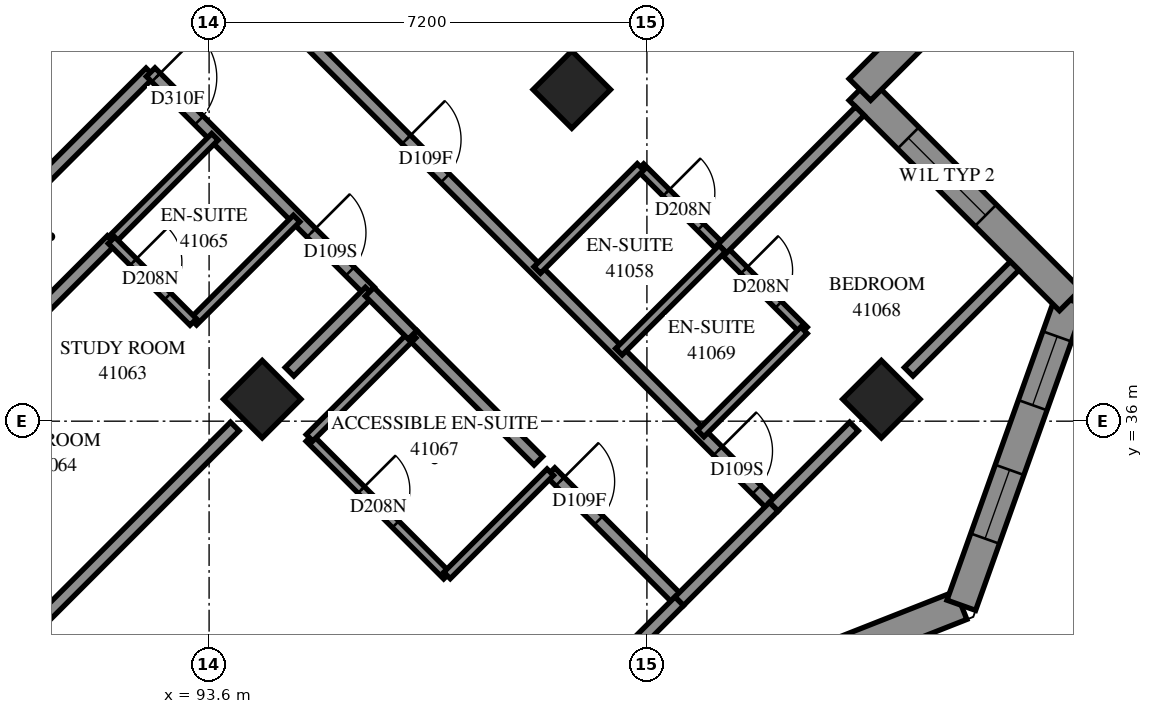
"""IFC4 building model, lengths in metres.
Left out: names, types, materials, properties, quantities, classifications, styles, units other than length and angle.
Written with IfcOpenShell. Run it as: python <this file> out.ifc"""

import sys

from ifc_helpers import new_model, si_unit, direction, frame, frame_2d, origin, origin_2d, place, context, subcontext, project, spatial, polyline, rectangle, outline, extrude, element, fill, save


model = new_model("IFC4")
c1 = context("Model", 3, precision=1e-05, world=origin(), true_north=direction((0.0, 1.0)))
c2 = subcontext(c1, "Body", "Model", "MODEL_VIEW")
j1 = project(units=[si_unit("LENGTHUNIT", "METRE"), si_unit("PLANEANGLEUNIT", "RADIAN")], contexts=[c1])
p1 = place(None, origin())
s1 = spatial("IfcSite", under=j1, at=p1, CompositionType="ELEMENT")
p2 = place(p1, origin())
s2 = spatial("IfcBuilding", under=s1, at=p2, CompositionType="ELEMENT")
p3 = place(p2, frame((0.0, 0.0, 152.4)))
s3 = spatial("IfcBuildingStorey", under=s2, at=p3, CompositionType="ELEMENT", Elevation=152.4)
for number, where, z_axis, x_axis in (
    (1, (99.565, 41.453, 0.0), (0.0, 0.0, 1.0), (0.707, -0.707, 0.0)),
    (2, (94.474, 36.362, 0.0), (0.0, 0.0, 1.0), (0.707, -0.707, 0.0)),
    (3, (104.656, 36.362, 0.0), (0.0, 0.0, 1.0), (0.707, -0.707, 0.0)),
):
    element("IfcColumn", number, at=place(p3, frame(where, z_axis=z_axis, x_axis=x_axis)), inside=s3, PredefinedType="COLUMN", context=c2, shape_type="SweptSolid", body=[
        extrude(rectangle(XDim=0.9, YDim=0.9, at=origin_2d()), origin(), (0.0, 0.0, 1.0), 3.1),
    ])
p4 = place(p3, frame((87.049, 38.695, -0.3), z_axis=(0.0, 0.0, 1.0), x_axis=(0.7071067812, 0.7071067812, 0.0)))
e4 = element("IfcWall", 4, at=p4, inside=s3, PredefinedType="SHEAR", context=c2, shape_type="SweptSolid", body=[
    extrude(rectangle(XDim=14.4, YDim=0.6, at=frame_2d((7.2, 0.0))), origin(), (0.0, 0.0, 1.0), 2.7),
])
p5 = place(p4, frame((4.55, 0.0, 0.3)))
e5 = element("IfcOpeningElement", 5, at=p5, cuts=e4, PredefinedType="OPENING", context=c2, shape_type="SweptSolid", body=[
    extrude(rectangle(XDim=1.1, YDim=2.1, at=frame_2d((0.55, 1.05))), frame((0.0, 0.31, 0.0), z_axis=(0.0, -1.0, 0.0), x_axis=(1.0, 0.0, 0.0)), (0.0, 0.0, 1.0), 0.62),
])
p6 = place(p4, frame((11.35, 0.0, 0.3)))
e6 = element("IfcOpeningElement", 6, at=p6, cuts=e4, PredefinedType="OPENING", context=c2, shape_type="SweptSolid", body=[
    extrude(rectangle(XDim=1.1, YDim=2.1, at=frame_2d((0.55, 1.05))), frame((0.0, 0.31, 0.0), z_axis=(0.0, -1.0, 0.0), x_axis=(1.0, 0.0, 0.0)), (0.0, 0.0, 1.0), 0.62),
])
p7 = place(p3, frame((100.839, 30.95, 0.0), z_axis=(0.0, 0.0, 1.0), x_axis=(0.9303343627, 0.3667123852, 0.0)))
e7 = element("IfcWall", 7, at=p7, inside=s3, PredefinedType="SOLIDWALL", context=c2, shape_type="SweptSolid", body=[
    extrude(outline(polyline([(0.109, -0.25), (5.629, -0.25), (5.402, 0.25), (-0.109, 0.25), (0.109, -0.25)])), origin(), (0.0, 0.0, 1.0), 3.1),
])
p8 = place(p7, frame((0.614, 0.0, 0.45)))
e8 = element("IfcOpeningElement", 8, at=p8, cuts=e7, PredefinedType="OPENING", context=c2, shape_type="SweptSolid", body=[
    extrude(rectangle(XDim=2.8, YDim=2.5, at=frame_2d((1.4, 1.25))), frame((0.0, 0.26, 0.0), z_axis=(0.0, -1.0, 0.0), x_axis=(1.0, 0.0, 0.0)), (0.0, 0.0, 1.0), 0.52),
])
p9 = place(p3, frame((105.97, 32.973, 0.0), z_axis=(0.0, 0.0, 1.0), x_axis=(0.3360618931, 0.9418399036, 0.0)))
e9 = element("IfcWall", 9, at=p9, inside=s3, PredefinedType="SOLIDWALL", context=c2, shape_type="SweptSolid", body=[
    extrude(outline(polyline([(-0.114, -0.25), (5.489, -0.25), (5.173, 0.25), (0.114, 0.25), (-0.114, -0.25)])), origin(), (0.0, 0.0, 1.0), 3.1),
])
p10 = place(p9, frame((1.164, 0.0, 0.45)))
e10 = element("IfcOpeningElement", 10, at=p10, cuts=e9, PredefinedType="OPENING", context=c2, shape_type="SweptSolid", body=[
    extrude(rectangle(XDim=1.2, YDim=2.5, at=frame_2d((0.6, 1.25))), frame((0.0, 0.26, 0.0), z_axis=(0.0, -1.0, 0.0), x_axis=(1.0, 0.0, 0.0)), (0.0, 0.0, 1.0), 0.52),
])
p11 = place(p9, frame((3.494, 0.0, 0.45)))
e11 = element("IfcOpeningElement", 11, at=p11, cuts=e9, PredefinedType="OPENING", context=c2, shape_type="SweptSolid", body=[
    extrude(rectangle(XDim=1.2, YDim=2.5, at=frame_2d((0.6, 1.25))), frame((0.0, 0.26, 0.0), z_axis=(0.0, -1.0, 0.0), x_axis=(1.0, 0.0, 0.0)), (0.0, 0.0, 1.0), 0.52),
])
p12 = place(p3, frame((107.761, 37.994, 0.0), z_axis=(0.0, 0.0, 1.0), x_axis=(-0.7071272228, 0.707086339, 0.0)))
e12 = element("IfcWall", 12, at=p12, inside=s3, PredefinedType="SOLIDWALL", context=c2, shape_type="SweptSolid", body=[
    extrude(outline(polyline([(-0.158, -0.25), (4.642, -0.25), (5.142, 0.25), (0.158, 0.25), (-0.158, -0.25)])), origin(), (0.0, 0.0, 1.0), 3.1),
])
p13 = place(p12, frame((1.967, 0.0, 0.6)))
e13 = element("IfcOpeningElement", 13, at=p13, cuts=e12, PredefinedType="OPENING", context=c2, shape_type="SweptSolid", body=[
    extrude(rectangle(XDim=1.8, YDim=1.9, at=frame_2d((0.9, 0.95))), frame((0.0, 0.26, 0.0), z_axis=(0.0, -1.0, 0.0), x_axis=(1.0, 0.0, 0.0)), (0.0, 0.0, 1.0), 0.52),
])
p14 = place(p3, frame((104.302, 41.453, 0.0), z_axis=(0.0, 0.0, 1.0), x_axis=(0.7071241375, 0.7070894244, 0.0)))
e14 = element("IfcWall", 14, at=p14, inside=s3, PredefinedType="SOLIDWALL", context=c2, shape_type="SweptSolid", body=[
    extrude(outline(polyline([(0.25, -0.25), (6.101, -0.25), (5.422, 0.25), (-0.25, 0.25), (0.25, -0.25)])), origin(), (0.0, 0.0, 1.0), 3.1),
])
p15 = place(p14, frame((1.125, 0.0, 0.6)))
e15 = element("IfcOpeningElement", 15, at=p15, cuts=e14, PredefinedType="OPENING", context=c2, shape_type="SweptSolid", body=[
    extrude(rectangle(XDim=1.8, YDim=1.9, at=frame_2d((0.9, 0.95))), frame((0.0, 0.26, 0.0), z_axis=(0.0, -1.0, 0.0), x_axis=(1.0, 0.0, 0.0)), (0.0, 0.0, 1.0), 0.52),
])
p16 = place(p3, frame((94.189, 43.287, 0.0), z_axis=(0.0, 0.0, 1.0), x_axis=(0.7071067812, -0.7071067812, 0.0)))
e16 = element("IfcWall", 16, at=p16, inside=s3, PredefinedType="PARTITIONING", context=c2, shape_type="SweptSolid", body=[
    extrude(rectangle(XDim=12.298, YDim=0.2, at=frame_2d((6.149, 0.0))), origin(), (0.0, 0.0, 1.0), 3.1),
])
p17 = place(p16, frame((3.755, 0.0, 0.0)))
e17 = element("IfcOpeningElement", 17, at=p17, cuts=e16, PredefinedType="OPENING", context=c2, shape_type="SweptSolid", body=[
    extrude(rectangle(XDim=0.9, YDim=2.1, at=frame_2d((0.45, 1.05))), frame((0.0, 0.11, 0.0), z_axis=(0.0, -1.0, 0.0), x_axis=(1.0, 0.0, 0.0)), (0.0, 0.0, 1.0), 0.22),
])
p18 = place(p16, frame((10.998, 0.0, 0.0)))
e18 = element("IfcOpeningElement", 18, at=p18, cuts=e16, PredefinedType="OPENING", context=c2, shape_type="SweptSolid", body=[
    extrude(rectangle(XDim=0.9, YDim=2.1, at=frame_2d((0.45, 1.05))), frame((0.0, 0.11, 0.0), z_axis=(0.0, -1.0, 0.0), x_axis=(1.0, 0.0, 0.0)), (0.0, 0.0, 1.0), 0.22),
])
p19 = place(p3, frame((86.836, 35.938, 0.0), z_axis=(0.0, 0.0, 1.0), x_axis=(0.7071067812, 0.7071067812, 0.0)))
e19 = element("IfcWall", 19, at=p19, inside=s3, PredefinedType="PARTITIONING", context=c2, shape_type="SweptSolid", body=[
    extrude(rectangle(XDim=8.2, YDim=0.2, at=frame_2d((4.1, 0.0))), origin(), (0.0, 0.0, 1.0), 3.1),
])
p20 = place(p3, frame((86.33, 33.311, 0.0), z_axis=(0.0, 0.0, 1.0), x_axis=(0.707100543, 0.7071130194, 0.0)))
e20 = element("IfcWall", 20, at=p20, inside=s3, PredefinedType="PARTITIONING", context=c2, shape_type="SweptSolid", body=[
    extrude(rectangle(XDim=8.015, YDim=0.2, at=frame_2d((4.008, 0.0))), origin(), (0.0, 0.0, 1.0), 3.1),
])
p21 = place(p3, frame((89.831, 31.721, 0.0), z_axis=(0.0, 0.0, 1.0), x_axis=(0.7071067812, 0.7071067812, 0.0)))
e21 = element("IfcWall", 21, at=p21, inside=s3, PredefinedType="PARTITIONING", context=c2, shape_type="SweptSolid", body=[
    extrude(rectangle(XDim=5.928, YDim=0.2, at=frame_2d((2.964, 0.0))), origin(), (0.0, 0.0, 1.0), 3.1),
])
p22 = place(p3, frame((92.639, 41.739, 0.0), z_axis=(0.0, 0.0, 1.0), x_axis=(0.7071067812, -0.7071067812, 0.0)))
e22 = element("IfcWall", 22, at=p22, inside=s3, PredefinedType="PARTITIONING", context=c2, shape_type="SweptSolid", body=[
    extrude(rectangle(XDim=5.1, YDim=0.2, at=frame_2d((2.55, 0.0))), origin(), (0.0, 0.0, 1.0), 3.1),
])
p23 = place(p22, frame((0.123, 0.0, 0.0)))
e23 = element("IfcOpeningElement", 23, at=p23, cuts=e22, PredefinedType="OPENING", context=c2, shape_type="SweptSolid", body=[
    extrude(rectangle(XDim=1.0, YDim=2.1, at=frame_2d((0.5, 1.05))), frame((0.0, 0.11, 0.0), z_axis=(0.0, -1.0, 0.0), x_axis=(1.0, 0.0, 0.0)), (0.0, 0.0, 1.0), 0.22),
])
p24 = place(p22, frame((3.734, 0.0, 0.0)))
e24 = element("IfcOpeningElement", 24, at=p24, cuts=e22, PredefinedType="OPENING", context=c2, shape_type="SweptSolid", body=[
    extrude(rectangle(XDim=0.9, YDim=2.1, at=frame_2d((0.45, 1.05))), frame((0.0, 0.11, 0.0), z_axis=(0.0, -1.0, 0.0), x_axis=(1.0, 0.0, 0.0)), (0.0, 0.0, 1.0), 0.22),
])
p25 = place(p3, frame((100.694, 40.178, 0.0), z_axis=(0.0, 0.0, 1.0), x_axis=(0.7076329021, -0.7065802685, 0.0)))
e25 = element("IfcWall", 25, at=p25, inside=s3, PredefinedType="PARTITIONING", context=c2, shape_type="SweptSolid", body=[
    extrude(rectangle(XDim=3.8, YDim=0.15, at=frame_2d((1.9, 0.0))), origin(), (0.0, 0.0, 1.0), 3.1),
])
p26 = place(p25, frame((0.598, 0.0, 0.0)))
e26 = element("IfcOpeningElement", 26, at=p26, cuts=e25, PredefinedType="OPENING", context=c2, shape_type="SweptSolid", body=[
    extrude(rectangle(XDim=0.8, YDim=2.1, at=frame_2d((0.4, 1.05))), frame((0.0, 0.085, 0.0), z_axis=(0.0, -1.0, 0.0), x_axis=(1.0, 0.0, 0.0)), (0.0, 0.0, 1.0), 0.17),
])
p27 = place(p25, frame((2.405, 0.0, 0.0)))
e27 = element("IfcOpeningElement", 27, at=p27, cuts=e25, PredefinedType="OPENING", context=c2, shape_type="SweptSolid", body=[
    extrude(rectangle(XDim=0.8, YDim=2.1, at=frame_2d((0.4, 1.05))), frame((0.0, 0.085, 0.0), z_axis=(0.0, -1.0, 0.0), x_axis=(1.0, 0.0, 0.0)), (0.0, 0.0, 1.0), 0.17),
])
p28 = place(p3, frame((95.249, 35.723, 0.0), z_axis=(0.0, 0.0, 1.0), x_axis=(0.7067942478, -0.7074191764, 0.0)))
e28 = element("IfcWall", 28, at=p28, inside=s3, PredefinedType="PARTITIONING", context=c2, shape_type="SweptSolid", body=[
    extrude(rectangle(XDim=3.2, YDim=0.15, at=frame_2d((1.6, 0.0))), origin(), (0.0, 0.0, 1.0), 3.1),
])
p29 = place(p28, frame((1.206, 0.0, 0.0)))
e29 = element("IfcOpeningElement", 29, at=p29, cuts=e28, PredefinedType="OPENING", context=c2, shape_type="SweptSolid", body=[
    extrude(rectangle(XDim=0.8, YDim=2.1, at=frame_2d((0.4, 1.05))), frame((0.0, 0.085, 0.0), z_axis=(0.0, -1.0, 0.0), x_axis=(1.0, 0.0, 0.0)), (0.0, 0.0, 1.0), 0.17),
])
p30 = place(p3, frame((102.04, 38.838, 0.0), z_axis=(0.0, 0.0, 1.0), x_axis=(0.7071067812, 0.7071067812, 0.0)))
e30 = element("IfcWall", 30, at=p30, inside=s3, PredefinedType="PARTITIONING", context=c2, shape_type="SweptSolid", body=[
    extrude(rectangle(XDim=3.199, YDim=0.2, at=frame_2d((1.599, 0.0))), origin(), (0.0, 0.0, 1.0), 3.1),
])
p31 = place(p3, frame((99.214, 35.162, 0.0), z_axis=(0.0, 0.0, 1.0), x_axis=(0.706773319, -0.7074400862, 0.0)))
e31 = element("IfcWall", 31, at=p31, inside=s3, PredefinedType="PARTITIONING", context=c2, shape_type="SweptSolid", body=[
    extrude(rectangle(XDim=2.999, YDim=0.2, at=frame_2d((1.5, 0.0))), origin(), (0.0, 0.0, 1.0), 3.1),
])
p32 = place(p31, frame((0.22, 0.0, 0.0)))
e32 = element("IfcOpeningElement", 32, at=p32, cuts=e31, PredefinedType="OPENING", context=c2, shape_type="SweptSolid", body=[
    extrude(rectangle(XDim=0.9, YDim=2.1, at=frame_2d((0.45, 1.05))), frame((0.0, 0.11, 0.0), z_axis=(0.0, -1.0, 0.0), x_axis=(1.0, 0.0, 0.0)), (0.0, 0.0, 1.0), 0.22),
])
p33 = place(p3, frame((96.945, 37.419, 0.0), z_axis=(0.0, 0.0, 1.0), x_axis=(0.7071067812, -0.7071067812, 0.0)))
e33 = element("IfcWall", 33, at=p33, inside=s3, PredefinedType="PARTITIONING", context=c2, shape_type="SweptSolid", body=[
    extrude(rectangle(XDim=2.927, YDim=0.2, at=frame_2d((1.464, 0.0))), origin(), (0.0, 0.0, 1.0), 3.1),
])
p34 = place(p3, frame((105.105, 36.813, 0.0), z_axis=(0.0, 0.0, 1.0), x_axis=(0.7071067812, 0.7071067812, 0.0)))
e34 = element("IfcWall", 34, at=p34, inside=s3, PredefinedType="PARTITIONING", context=c2, shape_type="SweptSolid", body=[
    extrude(rectangle(XDim=2.463, YDim=0.2, at=frame_2d((1.232, 0.0))), origin(), (0.0, 0.0, 1.0), 3.1),
])
for number, where, z_axis, x_axis in (
    (35, (97.513, 33.463, 0.0), (0.0, 0.0, 1.0), (0.707, 0.707, 0.0)),
    (36, (93.341, 37.635, 0.0), (0.0, 0.0, 1.0), (0.707, 0.707, 0.0)),
    (37, (101.685, 35.797, 0.0), (0.0, 0.0, 1.0), (0.707, 0.707, 0.0)),
    (38, (91.997, 38.979, 0.0), (0.0, 0.0, 1.0), (0.707, 0.707, 0.0)),
):
    element("IfcWall", number, at=place(p3, frame(where, z_axis=z_axis, x_axis=x_axis)), inside=s3, PredefinedType="PARTITIONING", context=c2, shape_type="SweptSolid", body=[
        extrude(rectangle(XDim=2.401, YDim=0.15, at=frame_2d((1.201, 0.0))), origin(), (0.0, 0.0, 1.0), 3.1),
    ])
for number, where, z_axis, x_axis in (
    (39, (100.34, 37.142, 0.0), (0.0, 0.0, 1.0), (0.708, 0.707, 0.0)),
    (40, (98.996, 38.486, 0.0), (0.0, 0.0, 1.0), (0.708, 0.707, 0.0)),
):
    element("IfcWall", number, at=place(p3, frame(where, z_axis=z_axis, x_axis=x_axis)), inside=s3, PredefinedType="PARTITIONING", context=c2, shape_type="SweptSolid", body=[
        extrude(rectangle(XDim=2.4, YDim=0.15, at=frame_2d((1.2, 0.0))), origin(), (0.0, 0.0, 1.0), 3.1),
    ])
p35 = place(p3, frame((95.251, 35.727, 0.0), z_axis=(0.0, 0.0, 1.0), x_axis=(0.7071067812, 0.7071067812, 0.0)))
e41 = element("IfcWall", 41, at=p35, inside=s3, PredefinedType="PARTITIONING", context=c2, shape_type="SweptSolid", body=[
    extrude(rectangle(XDim=2.398, YDim=0.15, at=frame_2d((1.199, 0.0))), origin(), (0.0, 0.0, 1.0), 3.1),
])
p36 = place(p3, frame((101.331, 33.039, 0.0), z_axis=(0.0, 0.0, 1.0), x_axis=(0.7071067812, 0.7071067812, 0.0)))
e42 = element("IfcWall", 42, at=p36, inside=s3, PredefinedType="PARTITIONING", context=c2, shape_type="SweptSolid", body=[
    extrude(rectangle(XDim=2.2, YDim=0.2, at=frame_2d((1.1, 0.0))), origin(), (0.0, 0.0, 1.0), 2.6),
])
p37 = place(p3, frame((91.995, 38.975, 0.0), z_axis=(0.0, 0.0, 1.0), x_axis=(0.7071067812, -0.7071067812, 0.0)))
e43 = element("IfcWall", 43, at=p37, inside=s3, PredefinedType="PARTITIONING", context=c2, shape_type="SweptSolid", body=[
    extrude(rectangle(XDim=1.901, YDim=0.15, at=frame_2d((0.95, 0.0))), origin(), (0.0, 0.0, 1.0), 3.1),
])
p38 = place(p37, frame((0.506, 0.0, 0.0)))
e44 = element("IfcOpeningElement", 44, at=p38, cuts=e43, PredefinedType="OPENING", context=c2, shape_type="SweptSolid", body=[
    extrude(rectangle(XDim=0.8, YDim=2.1, at=frame_2d((0.4, 1.05))), frame((0.0, 0.085, 0.0), z_axis=(0.0, -1.0, 0.0), x_axis=(1.0, 0.0, 0.0)), (0.0, 0.0, 1.0), 0.17),
])
p39 = place(p3, frame((102.887, 34.595, 0.0), z_axis=(0.0, 0.0, 1.0), x_axis=(0.7071067812, 0.7071067812, 0.0)))
e45 = element("IfcWall", 45, at=p39, inside=s3, PredefinedType="PARTITIONING", context=c2, shape_type="SweptSolid", body=[
    extrude(rectangle(XDim=1.864, YDim=0.2, at=frame_2d((0.932, 0.0))), origin(), (0.0, 0.0, 1.0), 2.6),
])
p40 = place(p3, frame((94.923, 36.813, 0.0), z_axis=(0.0, 0.0, 1.0), x_axis=(0.7071067812, 0.7071067812, 0.0)))
e46 = element("IfcWall", 46, at=p40, inside=s3, PredefinedType="PARTITIONING", context=c2, shape_type="SweptSolid", body=[
    extrude(rectangle(XDim=1.864, YDim=0.2, at=frame_2d((0.932, 0.0))), origin(), (0.0, 0.0, 1.0), 3.1),
])
p41 = place(p3, frame((100.013, 31.721, 0.0), z_axis=(0.0, 0.0, 1.0), x_axis=(0.7071067812, 0.7071067812, 0.0)))
e47 = element("IfcWall", 47, at=p41, inside=s3, PredefinedType="PARTITIONING", context=c2, shape_type="SweptSolid", body=[
    extrude(rectangle(XDim=1.864, YDim=0.2, at=frame_2d((0.932, 0.0))), origin(), (0.0, 0.0, 1.0), 2.6),
])
p42 = place(p3, frame((96.24, 38.128, 0.0), z_axis=(0.0, 0.0, 1.0), x_axis=(0.7061059238, -0.7081062239, 0.0)))
e48 = element("IfcWall", 48, at=p42, inside=s3, PredefinedType="PARTITIONING", context=c2, shape_type="SweptSolid", body=[
    extrude(rectangle(XDim=1.0, YDim=0.2, at=frame_2d((0.5, 0.0))), origin(), (0.0, 0.0, 1.0), 3.1),
])
p43 = place(p10, origin())
e49 = element("IfcWindow", 49, at=p43, inside=s3, PartitioningType="SINGLE_PANEL", PredefinedType="WINDOW", context=c2, shape_type="SweptSolid", body=[
    extrude(rectangle(XDim=1.2, YDim=2.5, at=frame_2d((0.6, 1.25))), frame((0.0, 0.18, 0.0), z_axis=(0.0, -1.0, 0.0), x_axis=(1.0, 0.0, 0.0)), (0.0, 0.0, 1.0), 0.06),
])
fill(e10, e49)
p44 = place(p11, origin())
e50 = element("IfcWindow", 50, at=p44, inside=s3, PartitioningType="SINGLE_PANEL", PredefinedType="WINDOW", context=c2, shape_type="SweptSolid", body=[
    extrude(rectangle(XDim=1.2, YDim=2.5, at=frame_2d((0.6, 1.25))), frame((0.0, 0.18, 0.0), z_axis=(0.0, -1.0, 0.0), x_axis=(1.0, 0.0, 0.0)), (0.0, 0.0, 1.0), 0.06),
])
fill(e11, e50)
p45 = place(p13, origin())
e51 = element("IfcWindow", 51, at=p45, inside=s3, PartitioningType="SINGLE_PANEL", PredefinedType="WINDOW", context=c2, shape_type="SweptSolid", body=[
    extrude(rectangle(XDim=1.8, YDim=1.9, at=frame_2d((0.9, 0.95))), frame((0.0, 0.18, 0.0), z_axis=(0.0, -1.0, 0.0), x_axis=(1.0, 0.0, 0.0)), (0.0, 0.0, 1.0), 0.06),
])
fill(e13, e51)
p46 = place(p5, origin())
e52 = element("IfcDoor", 52, at=p46, inside=s3, OperationType="DOUBLE_DOOR_SINGLE_SWING", PredefinedType="DOOR", context=c2, shape_type="SweptSolid", body=[
    extrude(rectangle(XDim=1.1, YDim=2.1, at=frame_2d((0.55, 1.05))), frame((0.0, 0.025, 0.0), z_axis=(0.0, -1.0, 0.0), x_axis=(1.0, 0.0, 0.0)), (0.0, 0.0, 1.0), 0.05),
])
fill(e5, e52)
p47 = place(p17, origin())
e53 = element("IfcDoor", 53, at=p47, inside=s3, OperationType="SINGLE_SWING_RIGHT", PredefinedType="DOOR", context=c2, shape_type="SweptSolid", body=[
    extrude(rectangle(XDim=0.9, YDim=2.1, at=frame_2d((0.45, 1.05))), frame((0.0, 0.025, 0.0), z_axis=(0.0, -1.0, 0.0), x_axis=(1.0, 0.0, 0.0)), (0.0, 0.0, 1.0), 0.05),
])
fill(e17, e53)
p48 = place(p26, origin())
e54 = element("IfcDoor", 54, at=p48, inside=s3, OperationType="SINGLE_SWING_RIGHT", PredefinedType="DOOR", context=c2, shape_type="SweptSolid", body=[
    extrude(rectangle(XDim=0.8, YDim=2.1, at=frame_2d((0.4, 1.05))), frame((0.0, 0.025, 0.0), z_axis=(0.0, -1.0, 0.0), x_axis=(1.0, 0.0, 0.0)), (0.0, 0.0, 1.0), 0.05),
])
fill(e26, e54)
p49 = place(p23, origin())
e55 = element("IfcDoor", 55, at=p49, inside=s3, OperationType="SINGLE_SWING_RIGHT", PredefinedType="DOOR", context=c2, shape_type="SweptSolid", body=[
    extrude(rectangle(XDim=1.0, YDim=2.1, at=frame_2d((0.5, 1.05))), frame((0.0, 0.025, 0.0), z_axis=(0.0, -1.0, 0.0), x_axis=(1.0, 0.0, 0.0)), (0.0, 0.0, 1.0), 0.05),
])
fill(e23, e55)
p50 = place(p24, origin())
e56 = element("IfcDoor", 56, at=p50, inside=s3, OperationType="SINGLE_SWING_LEFT", PredefinedType="DOOR", context=c2, shape_type="SweptSolid", body=[
    extrude(rectangle(XDim=0.9, YDim=2.1, at=frame_2d((0.45, 1.05))), frame((0.0, 0.025, 0.0), z_axis=(0.0, -1.0, 0.0), x_axis=(1.0, 0.0, 0.0)), (0.0, 0.0, 1.0), 0.05),
])
fill(e24, e56)
p51 = place(p38, origin())
e57 = element("IfcDoor", 57, at=p51, inside=s3, OperationType="SINGLE_SWING_RIGHT", PredefinedType="DOOR", context=c2, shape_type="SweptSolid", body=[
    extrude(rectangle(XDim=0.8, YDim=2.1, at=frame_2d((0.4, 1.05))), frame((0.0, 0.025, 0.0), z_axis=(0.0, -1.0, 0.0), x_axis=(1.0, 0.0, 0.0)), (0.0, 0.0, 1.0), 0.05),
])
fill(e44, e57)
p52 = place(p32, origin())
e58 = element("IfcDoor", 58, at=p52, inside=s3, OperationType="SINGLE_SWING_RIGHT", PredefinedType="DOOR", context=c2, shape_type="SweptSolid", body=[
    extrude(rectangle(XDim=0.9, YDim=2.1, at=frame_2d((0.45, 1.05))), frame((0.0, 0.025, 0.0), z_axis=(0.0, -1.0, 0.0), x_axis=(1.0, 0.0, 0.0)), (0.0, 0.0, 1.0), 0.05),
])
fill(e32, e58)
p53 = place(p29, origin())
e59 = element("IfcDoor", 59, at=p53, inside=s3, OperationType="SINGLE_SWING_RIGHT", PredefinedType="DOOR", context=c2, shape_type="SweptSolid", body=[
    extrude(rectangle(XDim=0.8, YDim=2.1, at=frame_2d((0.4, 1.05))), frame((0.0, 0.025, 0.0), z_axis=(0.0, -1.0, 0.0), x_axis=(1.0, 0.0, 0.0)), (0.0, 0.0, 1.0), 0.05),
])
fill(e29, e59)
p54 = place(p18, origin())
e60 = element("IfcDoor", 60, at=p54, inside=s3, OperationType="SINGLE_SWING_RIGHT", PredefinedType="DOOR", context=c2, shape_type="SweptSolid", body=[
    extrude(rectangle(XDim=0.9, YDim=2.1, at=frame_2d((0.45, 1.05))), frame((0.0, 0.025, 0.0), z_axis=(0.0, -1.0, 0.0), x_axis=(1.0, 0.0, 0.0)), (0.0, 0.0, 1.0), 0.05),
])
fill(e18, e60)
p55 = place(p27, origin())
e61 = element("IfcDoor", 61, at=p55, inside=s3, OperationType="SINGLE_SWING_RIGHT", PredefinedType="DOOR", context=c2, shape_type="SweptSolid", body=[
    extrude(rectangle(XDim=0.8, YDim=2.1, at=frame_2d((0.4, 1.05))), frame((0.0, 0.025, 0.0), z_axis=(0.0, -1.0, 0.0), x_axis=(1.0, 0.0, 0.0)), (0.0, 0.0, 1.0), 0.05),
])
fill(e27, e61)
save(model, sys.argv[1])
